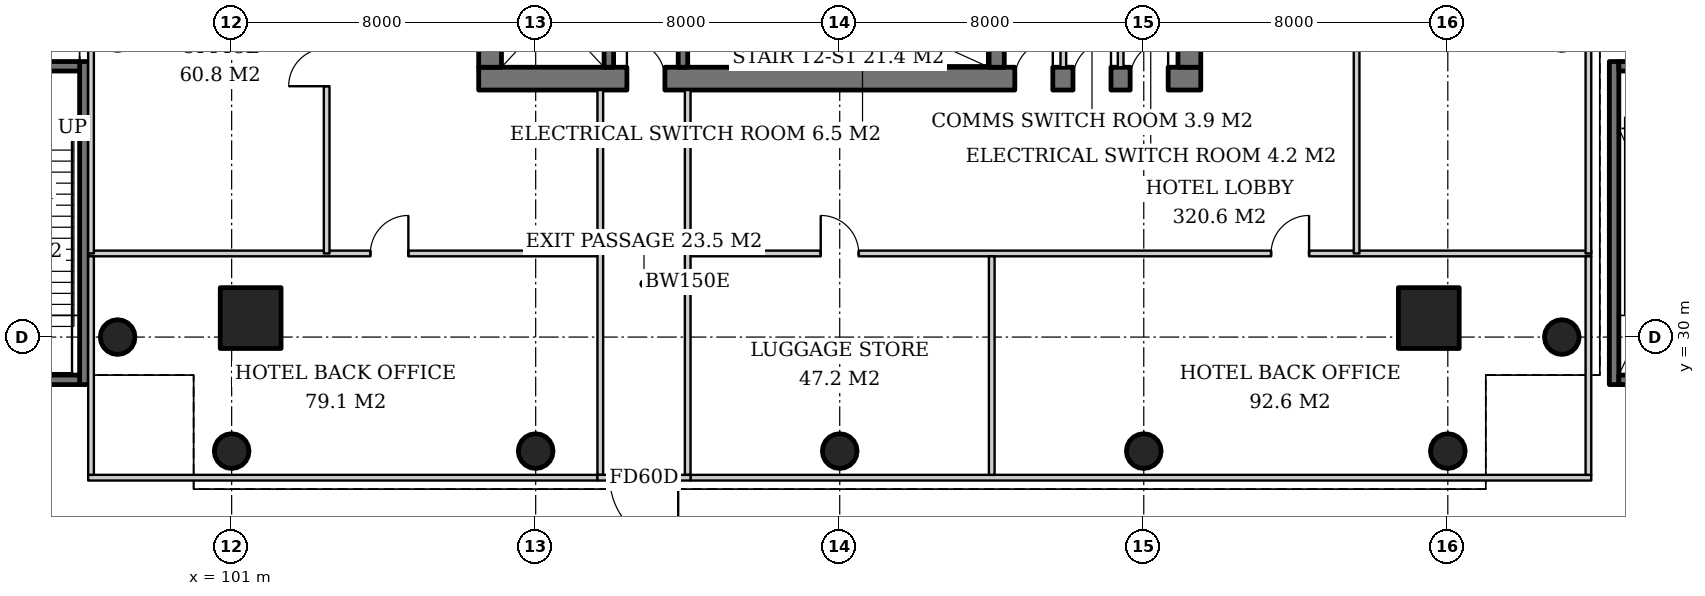
"""IFC4 building model, lengths in metres.
Left out: names, types, materials, properties, quantities, classifications, styles, units other than length and angle.
Written with IfcOpenShell. Run it as: python <this file> out.ifc"""

import sys

from ifc_helpers import new_model, si_unit, direction, frame, frame_2d, origin, origin_2d, place, context, subcontext, project, spatial, rectangle, hollow_circle, extrude, element, fill, save


model = new_model("IFC4")
c1 = context("Model", 3, precision=1e-05, world=origin(), true_north=direction((0.0, 1.0)))
c2 = subcontext(c1, "Body", "Model", "MODEL_VIEW")
j1 = project(units=[si_unit("LENGTHUNIT", "METRE"), si_unit("PLANEANGLEUNIT", "RADIAN")], contexts=[c1])
p1 = place(None, origin())
s1 = spatial("IfcSite", under=j1, at=p1, CompositionType="ELEMENT")
p2 = place(p1, origin())
s2 = spatial("IfcBuilding", under=s1, at=p2, CompositionType="ELEMENT")
p3 = place(p2, origin())
s3 = spatial("IfcBuildingStorey", under=s2, at=p3, CompositionType="ELEMENT", Elevation=0.0)
p4 = place(p3, frame((136.0, 30.0, 0.0), z_axis=(0.0, 0.0, 1.0), x_axis=(1.0, 0.0, 0.0)))
e1 = element("IfcColumn", 1, at=p4, inside=s3, PredefinedType="COLUMN", context=c2, shape_type="SweptSolid", body=[
    extrude(hollow_circle(Radius=0.457, WallThickness=0.03, at=origin_2d()), origin(), (0.0, 0.0, 1.0), 6.0),
])
p5 = place(p3, frame((101.5, 30.5, 0.0), z_axis=(0.0, 0.0, 1.0), x_axis=(1.0, 0.0, 0.0)))
e2 = element("IfcColumn", 2, at=p5, inside=s3, PredefinedType="COLUMN", context=c2, shape_type="SweptSolid", body=[
    extrude(rectangle(XDim=1.6, YDim=1.6, at=origin_2d()), origin(), (0.0, 0.0, 1.0), 6.0),
])
p6 = place(p3, frame((98.0, 30.0, 0.0), z_axis=(0.0, 0.0, 1.0), x_axis=(1.0, 0.0, 0.0)))
e3 = element("IfcColumn", 3, at=p6, inside=s3, PredefinedType="COLUMN", context=c2, shape_type="SweptSolid", body=[
    extrude(hollow_circle(Radius=0.457, WallThickness=0.03, at=origin_2d()), origin(), (0.0, 0.0, 1.0), 6.0),
])
p7 = place(p3, frame((132.5, 30.5, 0.0), z_axis=(0.0, 0.0, 1.0), x_axis=(1.0, 0.0, 0.0)))
e4 = element("IfcColumn", 4, at=p7, inside=s3, PredefinedType="COLUMN", context=c2, shape_type="SweptSolid", body=[
    extrude(rectangle(XDim=1.6, YDim=1.6, at=origin_2d()), origin(), (0.0, 0.0, 1.0), 6.0),
])
for number, where, z_axis, x_axis in (
    (5, (101.0, 27.0, 0.0), (0.0, 0.0, 1.0), (1.0, 0.0, 0.0)),
    (6, (133.0, 27.0, 0.0), (0.0, 0.0, 1.0), (1.0, 0.0, 0.0)),
    (7, (109.0, 27.0, 0.0), (0.0, 0.0, 1.0), (1.0, 0.0, 0.0)),
    (8, (117.0, 27.0, 0.0), (0.0, 0.0, 1.0), (1.0, 0.0, 0.0)),
    (9, (125.0, 27.0, 0.0), (0.0, 0.0, 1.0), (1.0, 0.0, 0.0)),
):
    element("IfcColumn", number, at=place(p3, frame(where, z_axis=z_axis, x_axis=x_axis)), inside=s3, PredefinedType="COLUMN", context=c2, shape_type="SweptSolid", body=[
        extrude(hollow_circle(Radius=0.457, WallThickness=0.03, at=origin_2d()), origin(), (0.0, 0.0, 1.0), 6.0),
    ])
p8 = place(p3, frame((107.5, 36.8, 0.0), z_axis=(0.0, 0.0, 1.0), x_axis=(1.0, 0.0, 0.0)))
e10 = element("IfcWall", 10, at=p8, inside=s3, PredefinedType="SHEAR", context=c2, shape_type="SweptSolid", body=[
    extrude(rectangle(XDim=19.0, YDim=0.6, at=frame_2d((9.5, 0.0))), origin(), (0.0, 0.0, 1.0), 6.0),
])
p9 = place(p8, frame((3.9, 0.0, 0.0)))
e11 = element("IfcOpeningElement", 11, at=p9, cuts=e10, PredefinedType="OPENING", context=c2, shape_type="SweptSolid", body=[
    extrude(rectangle(XDim=1.0, YDim=2.1, at=frame_2d((0.5, 1.05))), frame((0.0, 0.31, 0.0), z_axis=(0.0, -1.0, 0.0), x_axis=(1.0, 0.0, 0.0)), (0.0, 0.0, 1.0), 0.62),
])
p10 = place(p8, frame((14.107, 0.0, 0.0)))
e12 = element("IfcOpeningElement", 12, at=p10, cuts=e10, PredefinedType="OPENING", context=c2, shape_type="SweptSolid", body=[
    extrude(rectangle(XDim=1.0, YDim=2.1, at=frame_2d((0.5, 1.05))), frame((0.0, 0.31, 0.0), z_axis=(0.0, -1.0, 0.0), x_axis=(1.0, 0.0, 0.0)), (0.0, 0.0, 1.0), 0.62),
])
p11 = place(p8, frame((15.638, 0.0, 0.0)))
e13 = element("IfcOpeningElement", 13, at=p11, cuts=e10, PredefinedType="OPENING", context=c2, shape_type="SweptSolid", body=[
    extrude(rectangle(XDim=1.0, YDim=2.1, at=frame_2d((0.5, 1.05))), frame((0.0, 0.31, 0.0), z_axis=(0.0, -1.0, 0.0), x_axis=(1.0, 0.0, 0.0)), (0.0, 0.0, 1.0), 0.62),
])
p12 = place(p8, frame((17.142, 0.0, 0.0)))
e14 = element("IfcOpeningElement", 14, at=p12, cuts=e10, PredefinedType="OPENING", context=c2, shape_type="SweptSolid", body=[
    extrude(rectangle(XDim=1.0, YDim=2.1, at=frame_2d((0.5, 1.05))), frame((0.0, 0.31, 0.0), z_axis=(0.0, -1.0, 0.0), x_axis=(1.0, 0.0, 0.0)), (0.0, 0.0, 1.0), 0.62),
])
p13 = place(p3, frame((107.8, 37.1, 0.0), z_axis=(0.0, 0.0, 1.0), x_axis=(0.0, 1.0, 0.0)))
e15 = element("IfcWall", 15, at=p13, inside=s3, PredefinedType="SHEAR", context=c2, shape_type="SweptSolid", body=[
    extrude(rectangle(XDim=17.8, YDim=0.6, at=frame_2d((8.9, 0.0))), origin(), (0.0, 0.0, 1.0), 6.0),
])
p14 = place(p13, frame((8.0, 0.0, 0.0)))
e16 = element("IfcOpeningElement", 16, at=p14, cuts=e15, PredefinedType="OPENING", context=c2, shape_type="SweptSolid", body=[
    extrude(rectangle(XDim=1.8, YDim=2.4, at=frame_2d((0.9, 1.2))), frame((0.0, 0.31, 0.0), z_axis=(0.0, -1.0, 0.0), x_axis=(1.0, 0.0, 0.0)), (0.0, 0.0, 1.0), 0.62),
])
p15 = place(p3, frame((126.2, 37.1, 0.0), z_axis=(0.0, 0.0, 1.0), x_axis=(0.0, 1.0, 0.0)))
e17 = element("IfcWall", 17, at=p15, inside=s3, PredefinedType="SHEAR", context=c2, shape_type="SweptSolid", body=[
    extrude(rectangle(XDim=17.8, YDim=0.6, at=frame_2d((8.9, 0.0))), origin(), (0.0, 0.0, 1.0), 6.0),
])
p16 = place(p15, frame((8.0, 0.0, 0.0)))
e18 = element("IfcOpeningElement", 18, at=p16, cuts=e17, PredefinedType="OPENING", context=c2, shape_type="SweptSolid", body=[
    extrude(rectangle(XDim=1.8, YDim=2.4, at=frame_2d((0.9, 1.2))), frame((0.0, 0.31, 0.0), z_axis=(0.0, -1.0, 0.0), x_axis=(1.0, 0.0, 0.0)), (0.0, 0.0, 1.0), 0.62),
])
p17 = place(p3, frame((121.13, 37.1, 0.0), z_axis=(0.0, 0.0, 1.0), x_axis=(0.0, 1.0, 0.0)))
e19 = element("IfcWall", 19, at=p17, inside=s3, PredefinedType="SHEAR", context=c2, shape_type="SweptSolid", body=[
    extrude(rectangle(XDim=2.9, YDim=0.4, at=frame_2d((1.45, 0.0))), origin(), (0.0, 0.0, 1.0), 6.0),
])
p18 = place(p3, frame((110.925, 37.1, 0.0), z_axis=(0.0, 0.0, 1.0), x_axis=(0.0, 1.0, 0.0)))
e20 = element("IfcWall", 20, at=p18, inside=s3, PredefinedType="SHEAR", context=c2, shape_type="SweptSolid", body=[
    extrude(rectangle(XDim=2.9, YDim=0.25, at=frame_2d((1.45, 0.0))), origin(), (0.0, 0.0, 1.0), 6.0),
])
p19 = place(p18, frame((0.8, 0.0, 0.0)))
e21 = element("IfcOpeningElement", 21, at=p19, cuts=e20, PredefinedType="OPENING", context=c2, shape_type="SweptSolid", body=[
    extrude(rectangle(XDim=1.3, YDim=2.2, at=frame_2d((0.65, 1.1))), frame((0.0, 0.135, 0.0), z_axis=(0.0, -1.0, 0.0), x_axis=(1.0, 0.0, 0.0)), (0.0, 0.0, 1.0), 0.27),
])
p20 = place(p3, frame((112.875, 37.1, 0.0), z_axis=(0.0, 0.0, 1.0), x_axis=(0.0, 1.0, 0.0)))
e22 = element("IfcWall", 22, at=p20, inside=s3, PredefinedType="SHEAR", context=c2, shape_type="SweptSolid", body=[
    extrude(rectangle(XDim=2.9, YDim=0.25, at=frame_2d((1.45, 0.0))), origin(), (0.0, 0.0, 1.0), 6.0),
])
p21 = place(p20, frame((0.75, 0.0, 0.0)))
e23 = element("IfcOpeningElement", 23, at=p21, cuts=e22, PredefinedType="OPENING", context=c2, shape_type="SweptSolid", body=[
    extrude(rectangle(XDim=1.2, YDim=2.1, at=frame_2d((0.6, 1.05))), frame((0.0, 0.135, 0.0), z_axis=(0.0, -1.0, 0.0), x_axis=(1.0, 0.0, 0.0)), (0.0, 0.0, 1.0), 0.27),
])
for number, where, z_axis, x_axis in (
    (24, (122.884, 37.1, 0.0), (0.0, 0.0, 1.0), (0.0, 1.0, 0.0)),
    (25, (124.392, 37.1, 0.0), (0.0, 0.0, 1.0), (0.0, 1.0, 0.0)),
):
    element("IfcWall", number, at=place(p3, frame(where, z_axis=z_axis, x_axis=x_axis)), inside=s3, PredefinedType="SOLIDWALL", context=c2, shape_type="SweptSolid", body=[
        extrude(rectangle(XDim=2.9, YDim=0.15, at=frame_2d((1.45, 0.0))), origin(), (0.0, 0.0, 1.0), 5.7),
    ])
p22 = place(p3, frame((97.125, 28.75, 0.0), z_axis=(0.0, 0.0, 1.0), x_axis=(0.0, 1.0, 0.0)))
e26 = element("IfcWall", 26, at=p22, inside=s3, PredefinedType="SOLIDWALL", context=c2, shape_type="SweptSolid", body=[
    extrude(rectangle(XDim=8.5, YDim=0.25, at=frame_2d((4.25, 0.0))), origin(), (0.0, 0.0, 1.0), 5.7),
])
p23 = place(p3, frame((94.0, 28.875, 0.0), z_axis=(0.0, 0.0, 1.0), x_axis=(1.0, 0.0, 0.0)))
e27 = element("IfcWall", 27, at=p23, inside=s3, PredefinedType="SOLIDWALL", context=c2, shape_type="SweptSolid", body=[
    extrude(rectangle(XDim=3.0, YDim=0.25, at=frame_2d((1.5, 0.0))), origin(), (0.0, 0.0, 1.0), 5.7),
])
p24 = place(p3, frame((94.0, 37.125, 0.0), z_axis=(0.0, 0.0, 1.0), x_axis=(1.0, 0.0, 0.0)))
e28 = element("IfcWall", 28, at=p24, inside=s3, PredefinedType="SOLIDWALL", context=c2, shape_type="SweptSolid", body=[
    extrude(rectangle(XDim=3.0, YDim=0.25, at=frame_2d((1.5, 0.0))), origin(), (0.0, 0.0, 1.0), 5.7),
])
p25 = place(p24, frame((0.9, 0.0, 0.0)))
e29 = element("IfcOpeningElement", 29, at=p25, cuts=e28, PredefinedType="OPENING", context=c2, shape_type="SweptSolid", body=[
    extrude(rectangle(XDim=1.2, YDim=2.1, at=frame_2d((0.6, 1.05))), frame((0.0, 0.135, 0.0), z_axis=(0.0, -1.0, 0.0), x_axis=(1.0, 0.0, 0.0)), (0.0, 0.0, 1.0), 0.27),
])
p26 = place(p3, frame((137.375, 28.75, 0.0), z_axis=(0.0, 0.0, 1.0), x_axis=(0.0, 1.0, 0.0)))
e30 = element("IfcWall", 30, at=p26, inside=s3, PredefinedType="SOLIDWALL", context=c2, shape_type="SweptSolid", body=[
    extrude(rectangle(XDim=8.5, YDim=0.25, at=frame_2d((4.25, 0.0))), origin(), (0.0, 0.0, 1.0), 5.7),
])
p27 = place(p3, frame((137.5, 28.875, 0.0), z_axis=(0.0, 0.0, 1.0), x_axis=(1.0, 0.0, 0.0)))
e31 = element("IfcWall", 31, at=p27, inside=s3, PredefinedType="SOLIDWALL", context=c2, shape_type="SweptSolid", body=[
    extrude(rectangle(XDim=3.0, YDim=0.25, at=frame_2d((1.5, 0.0))), origin(), (0.0, 0.0, 1.0), 5.7),
])
p28 = place(p3, frame((137.5, 37.125, 0.0), z_axis=(0.0, 0.0, 1.0), x_axis=(1.0, 0.0, 0.0)))
e32 = element("IfcWall", 32, at=p28, inside=s3, PredefinedType="SOLIDWALL", context=c2, shape_type="SweptSolid", body=[
    extrude(rectangle(XDim=3.0, YDim=0.25, at=frame_2d((1.5, 0.0))), origin(), (0.0, 0.0, 1.0), 5.7),
])
p29 = place(p28, frame((0.9, 0.0, 0.0)))
e33 = element("IfcOpeningElement", 33, at=p29, cuts=e32, PredefinedType="OPENING", context=c2, shape_type="SweptSolid", body=[
    extrude(rectangle(XDim=1.2, YDim=2.1, at=frame_2d((0.6, 1.05))), frame((0.0, 0.135, 0.0), z_axis=(0.0, -1.0, 0.0), x_axis=(1.0, 0.0, 0.0)), (0.0, 0.0, 1.0), 0.27),
])
p30 = place(p3, frame((97.225, 26.3, 0.0), z_axis=(0.0, 0.0, 1.0), x_axis=(1.0, 0.0, 0.0)))
e34 = element("IfcWall", 34, at=p30, inside=s3, PredefinedType="PARTITIONING", context=c2, shape_type="SweptSolid", body=[
    extrude(rectangle(XDim=13.4, YDim=0.15, at=frame_2d((6.7, 0.0))), origin(), (0.0, 0.0, 1.0), 5.7),
])
p31 = place(p3, frame((113.075, 26.3, 0.0), z_axis=(0.0, 0.0, 1.0), x_axis=(1.0, 0.0, 0.0)))
e35 = element("IfcWall", 35, at=p31, inside=s3, PredefinedType="PARTITIONING", context=c2, shape_type="SweptSolid", body=[
    extrude(rectangle(XDim=23.7, YDim=0.15, at=frame_2d((11.85, 0.0))), origin(), (0.0, 0.0, 1.0), 5.7),
])
p32 = place(p3, frame((97.225, 32.2, 0.0), z_axis=(0.0, 0.0, 1.0), x_axis=(1.0, 0.0, 0.0)))
e36 = element("IfcWall", 36, at=p32, inside=s3, PredefinedType="PARTITIONING", context=c2, shape_type="SweptSolid", body=[
    extrude(rectangle(XDim=13.4, YDim=0.15, at=frame_2d((6.7, 0.0))), origin(), (0.0, 0.0, 1.0), 4.9),
])
p33 = place(p32, frame((7.425, 0.0, 0.0)))
e37 = element("IfcOpeningElement", 37, at=p33, cuts=e36, PredefinedType="OPENING", context=c2, shape_type="SweptSolid", body=[
    extrude(rectangle(XDim=1.0, YDim=2.1, at=frame_2d((0.5, 1.05))), frame((0.0, 0.085, 0.0), z_axis=(0.0, -1.0, 0.0), x_axis=(1.0, 0.0, 0.0)), (0.0, 0.0, 1.0), 0.17),
])
p34 = place(p3, frame((113.075, 32.2, 0.0), z_axis=(0.0, 0.0, 1.0), x_axis=(1.0, 0.0, 0.0)))
e38 = element("IfcWall", 38, at=p34, inside=s3, PredefinedType="PARTITIONING", context=c2, shape_type="SweptSolid", body=[
    extrude(rectangle(XDim=23.7, YDim=0.15, at=frame_2d((11.85, 0.0))), origin(), (0.0, 0.0, 1.0), 4.947),
])
p35 = place(p34, frame((3.425, 0.0, 0.0)))
e39 = element("IfcOpeningElement", 39, at=p35, cuts=e38, PredefinedType="OPENING", context=c2, shape_type="SweptSolid", body=[
    extrude(rectangle(XDim=1.0, YDim=2.1, at=frame_2d((0.5, 1.05))), frame((0.0, 0.085, 0.0), z_axis=(0.0, -1.0, 0.0), x_axis=(1.0, 0.0, 0.0)), (0.0, 0.0, 1.0), 0.17),
])
p36 = place(p34, frame((15.275, 0.0, 0.0)))
e40 = element("IfcOpeningElement", 40, at=p36, cuts=e38, PredefinedType="OPENING", context=c2, shape_type="SweptSolid", body=[
    extrude(rectangle(XDim=1.0, YDim=2.1, at=frame_2d((0.5, 1.05))), frame((0.0, 0.085, 0.0), z_axis=(0.0, -1.0, 0.0), x_axis=(1.0, 0.0, 0.0)), (0.0, 0.0, 1.0), 0.17),
])
for number, where, z_axis, x_axis in (
    (41, (97.3, 26.375, 0.0), (0.0, 0.0, 1.0), (0.0, 1.0, 0.0)),
    (42, (136.7, 26.375, 0.0), (0.0, 0.0, 1.0), (0.0, 1.0, 0.0)),
):
    element("IfcWall", number, at=place(p3, frame(where, z_axis=z_axis, x_axis=x_axis)), inside=s3, PredefinedType="PARTITIONING", context=c2, shape_type="SweptSolid", body=[
        extrude(rectangle(XDim=5.75, YDim=0.15, at=frame_2d((2.875, 0.0))), origin(), (0.0, 0.0, 1.0), 5.7),
    ])
p37 = place(p3, frame((121.0, 26.375, 0.0), z_axis=(0.0, 0.0, 1.0), x_axis=(0.0, 1.0, 0.0)))
e43 = element("IfcWall", 43, at=p37, inside=s3, PredefinedType="PARTITIONING", context=c2, shape_type="SweptSolid", body=[
    extrude(rectangle(XDim=5.75, YDim=0.15, at=frame_2d((2.875, 0.0))), origin(), (0.0, 0.0, 1.0), 5.15),
])
p38 = place(p3, frame((97.3, 32.2, 0.0), z_axis=(0.0, 0.0, 1.0), x_axis=(0.0, 1.0, 0.0)))
e44 = element("IfcWall", 44, at=p38, inside=s3, PredefinedType="PARTITIONING", context=c2, shape_type="SweptSolid", body=[
    extrude(rectangle(XDim=27.6, YDim=0.15, at=frame_2d((13.8, 0.0))), origin(), (0.0, 0.0, 1.0), 5.7),
])
p39 = place(p3, frame((103.5, 32.2, 0.0), z_axis=(0.0, 0.0, 1.0), x_axis=(0.0, 1.0, 0.0)))
e45 = element("IfcWall", 45, at=p39, inside=s3, PredefinedType="PARTITIONING", context=c2, shape_type="SweptSolid", body=[
    extrude(rectangle(XDim=27.6, YDim=0.15, at=frame_2d((13.8, 0.0))), origin(), (0.0, 0.0, 1.0), 4.9),
])
p40 = place(p39, frame((4.4, 0.0, 0.0)))
e46 = element("IfcOpeningElement", 46, at=p40, cuts=e45, PredefinedType="OPENING", context=c2, shape_type="SweptSolid", body=[
    extrude(rectangle(XDim=1.0, YDim=2.1, at=frame_2d((0.5, 1.05))), frame((0.0, 0.085, 0.0), z_axis=(0.0, -1.0, 0.0), x_axis=(1.0, 0.0, 0.0)), (0.0, 0.0, 1.0), 0.17),
])
p41 = place(p39, frame((13.3, 0.0, 0.0)))
e47 = element("IfcOpeningElement", 47, at=p41, cuts=e45, PredefinedType="OPENING", context=c2, shape_type="SweptSolid", body=[
    extrude(rectangle(XDim=1.0, YDim=2.1, at=frame_2d((0.5, 1.05))), frame((0.0, 0.085, 0.0), z_axis=(0.0, -1.0, 0.0), x_axis=(1.0, 0.0, 0.0)), (0.0, 0.0, 1.0), 0.17),
])
p42 = place(p39, frame((22.2, 0.0, 0.0)))
e48 = element("IfcOpeningElement", 48, at=p42, cuts=e45, PredefinedType="OPENING", context=c2, shape_type="SweptSolid", body=[
    extrude(rectangle(XDim=1.0, YDim=2.1, at=frame_2d((0.5, 1.05))), frame((0.0, 0.085, 0.0), z_axis=(0.0, -1.0, 0.0), x_axis=(1.0, 0.0, 0.0)), (0.0, 0.0, 1.0), 0.17),
])
p43 = place(p3, frame((130.6, 32.2, 0.0), z_axis=(0.0, 0.0, 1.0), x_axis=(0.0, 1.0, 0.0)))
e49 = element("IfcWall", 49, at=p43, inside=s3, PredefinedType="PARTITIONING", context=c2, shape_type="SweptSolid", body=[
    extrude(rectangle(XDim=27.6, YDim=0.15, at=frame_2d((13.8, 0.0))), origin(), (0.0, 0.0, 1.0), 4.9),
])
p44 = place(p43, frame((6.4, 0.0, 0.0)))
e50 = element("IfcOpeningElement", 50, at=p44, cuts=e49, PredefinedType="OPENING", context=c2, shape_type="SweptSolid", body=[
    extrude(rectangle(XDim=1.0, YDim=2.1, at=frame_2d((0.5, 1.05))), frame((0.0, 0.085, 0.0), z_axis=(0.0, -1.0, 0.0), x_axis=(1.0, 0.0, 0.0)), (0.0, 0.0, 1.0), 0.17),
])
p45 = place(p43, frame((20.2, 0.0, 0.0)))
e51 = element("IfcOpeningElement", 51, at=p45, cuts=e49, PredefinedType="OPENING", context=c2, shape_type="SweptSolid", body=[
    extrude(rectangle(XDim=1.0, YDim=2.1, at=frame_2d((0.5, 1.05))), frame((0.0, 0.085, 0.0), z_axis=(0.0, -1.0, 0.0), x_axis=(1.0, 0.0, 0.0)), (0.0, 0.0, 1.0), 0.17),
])
p46 = place(p3, frame((136.7, 32.2, 0.0), z_axis=(0.0, 0.0, 1.0), x_axis=(0.0, 1.0, 0.0)))
e52 = element("IfcWall", 52, at=p46, inside=s3, PredefinedType="PARTITIONING", context=c2, shape_type="SweptSolid", body=[
    extrude(rectangle(XDim=27.6, YDim=0.15, at=frame_2d((13.8, 0.0))), origin(), (0.0, 0.0, 1.0), 5.7),
])
for number, where, z_axis, x_axis in (
    (53, (110.7, 26.375, 0.0), (0.0, 0.0, 1.0), (0.0, 1.0, 0.0)),
    (54, (113.0, 26.375, 0.0), (0.0, 0.0, 1.0), (0.0, 1.0, 0.0)),
):
    element("IfcWall", number, at=place(p3, frame(where, z_axis=z_axis, x_axis=x_axis)), inside=s3, PredefinedType="SOLIDWALL", context=c2, shape_type="SweptSolid", body=[
        extrude(rectangle(XDim=10.125, YDim=0.15, at=frame_2d((5.062, 0.0))), origin(), (0.0, 0.0, 1.0), 5.15),
    ])
p47 = place(p3, frame((113.075, 26.3, 0.0), z_axis=(0.0, 0.0, 1.0), x_axis=(-1.0, 0.0, 0.0)))
e55 = element("IfcWall", 55, at=p47, inside=s3, PredefinedType="SOLIDWALL", context=c2, shape_type="SweptSolid", body=[
    extrude(rectangle(XDim=2.45, YDim=0.15, at=frame_2d((1.225, 0.0))), origin(), (0.0, 0.0, 1.0), 5.7),
])
p48 = place(p47, frame((0.325, 0.0, 0.0)))
e56 = element("IfcOpeningElement", 56, at=p48, cuts=e55, PredefinedType="OPENING", context=c2, shape_type="SweptSolid", body=[
    extrude(rectangle(XDim=1.8, YDim=2.4, at=frame_2d((0.9, 1.2))), frame((0.0, 0.085, 0.0), z_axis=(0.0, -1.0, 0.0), x_axis=(1.0, 0.0, 0.0)), (0.0, 0.0, 1.0), 0.17),
])
p49 = place(p9, origin())
e57 = element("IfcDoor", 57, at=p49, inside=s3, OperationType="SINGLE_SWING_LEFT", PredefinedType="DOOR", context=c2, shape_type="SweptSolid", body=[
    extrude(rectangle(XDim=1.0, YDim=2.1, at=frame_2d((0.5, 1.05))), frame((0.0, 0.025, 0.0), z_axis=(0.0, -1.0, 0.0), x_axis=(1.0, 0.0, 0.0)), (0.0, 0.0, 1.0), 0.05),
])
fill(e11, e57)
p50 = place(p10, origin())
e58 = element("IfcDoor", 58, at=p50, inside=s3, OperationType="SINGLE_SWING_RIGHT", PredefinedType="DOOR", context=c2, shape_type="SweptSolid", body=[
    extrude(rectangle(XDim=1.0, YDim=2.1, at=frame_2d((0.5, 1.05))), frame((0.0, 0.29, 0.0), z_axis=(0.0, -1.0, 0.0), x_axis=(1.0, 0.0, 0.0)), (0.0, 0.0, 1.0), 0.05),
])
fill(e12, e58)
p51 = place(p11, origin())
e59 = element("IfcDoor", 59, at=p51, inside=s3, OperationType="SINGLE_SWING_RIGHT", PredefinedType="DOOR", context=c2, shape_type="SweptSolid", body=[
    extrude(rectangle(XDim=1.0, YDim=2.1, at=frame_2d((0.5, 1.05))), frame((0.0, 0.29, 0.0), z_axis=(0.0, -1.0, 0.0), x_axis=(1.0, 0.0, 0.0)), (0.0, 0.0, 1.0), 0.05),
])
fill(e13, e59)
p52 = place(p12, origin())
e60 = element("IfcDoor", 60, at=p52, inside=s3, OperationType="SINGLE_SWING_RIGHT", PredefinedType="DOOR", context=c2, shape_type="SweptSolid", body=[
    extrude(rectangle(XDim=1.0, YDim=2.1, at=frame_2d((0.5, 1.05))), frame((0.0, 0.29, 0.0), z_axis=(0.0, -1.0, 0.0), x_axis=(1.0, 0.0, 0.0)), (0.0, 0.0, 1.0), 0.05),
])
fill(e14, e60)
p53 = place(p33, origin())
e61 = element("IfcDoor", 61, at=p53, inside=s3, OperationType="SINGLE_SWING_RIGHT", PredefinedType="DOOR", context=c2, shape_type="SweptSolid", body=[
    extrude(rectangle(XDim=1.0, YDim=2.1, at=frame_2d((0.5, 1.05))), frame((0.0, 0.025, 0.0), z_axis=(0.0, -1.0, 0.0), x_axis=(1.0, 0.0, 0.0)), (0.0, 0.0, 1.0), 0.05),
])
fill(e37, e61)
p54 = place(p35, origin())
e62 = element("IfcDoor", 62, at=p54, inside=s3, OperationType="SINGLE_SWING_LEFT", PredefinedType="DOOR", context=c2, shape_type="SweptSolid", body=[
    extrude(rectangle(XDim=1.0, YDim=2.1, at=frame_2d((0.5, 1.05))), frame((0.0, 0.025, 0.0), z_axis=(0.0, -1.0, 0.0), x_axis=(1.0, 0.0, 0.0)), (0.0, 0.0, 1.0), 0.05),
])
fill(e39, e62)
p55 = place(p36, origin())
e63 = element("IfcDoor", 63, at=p55, inside=s3, OperationType="SINGLE_SWING_RIGHT", PredefinedType="DOOR", context=c2, shape_type="SweptSolid", body=[
    extrude(rectangle(XDim=1.0, YDim=2.1, at=frame_2d((0.5, 1.05))), frame((0.0, 0.025, 0.0), z_axis=(0.0, -1.0, 0.0), x_axis=(1.0, 0.0, 0.0)), (0.0, 0.0, 1.0), 0.05),
])
fill(e40, e63)
p56 = place(p40, origin())
e64 = element("IfcDoor", 64, at=p56, inside=s3, OperationType="SINGLE_SWING_LEFT", PredefinedType="DOOR", context=c2, shape_type="SweptSolid", body=[
    extrude(rectangle(XDim=1.0, YDim=2.1, at=frame_2d((0.5, 1.05))), frame((0.0, 0.025, 0.0), z_axis=(0.0, -1.0, 0.0), x_axis=(1.0, 0.0, 0.0)), (0.0, 0.0, 1.0), 0.05),
])
fill(e46, e64)
p57 = place(p48, origin())
e65 = element("IfcDoor", 65, at=p57, inside=s3, OperationType="DOUBLE_DOOR_SINGLE_SWING", PredefinedType="DOOR", context=c2, shape_type="SweptSolid", body=[
    extrude(rectangle(XDim=1.8, YDim=2.4, at=frame_2d((0.9, 1.2))), frame((0.0, 0.025, 0.0), z_axis=(0.0, -1.0, 0.0), x_axis=(1.0, 0.0, 0.0)), (0.0, 0.0, 1.0), 0.05),
])
fill(e56, e65)
save(model, sys.argv[1])
